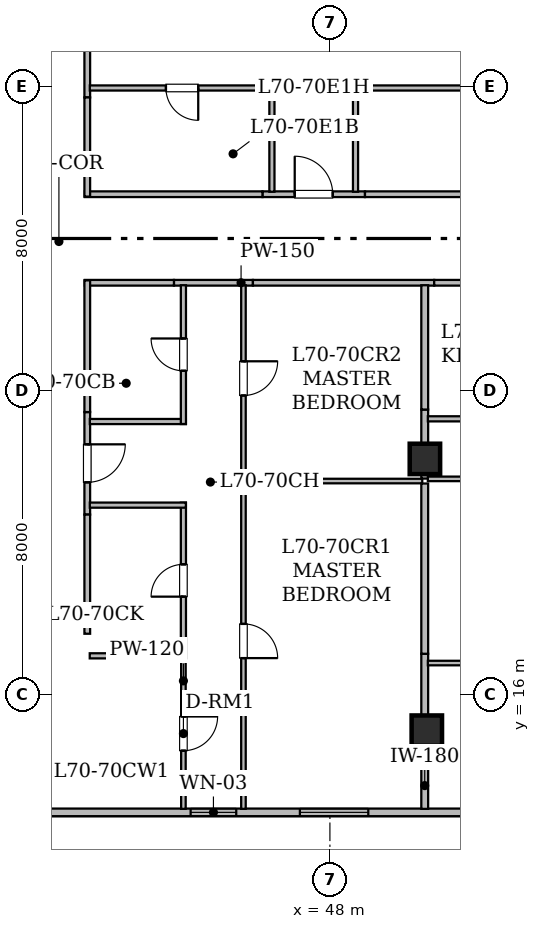
"""IFC4 building model, lengths in metres.
Left out: names, types, materials, properties, quantities, classifications, styles, units other than length and angle.
Written with IfcOpenShell. Run it as: python <this file> out.ifc"""

import sys

from ifc_helpers import new_model, si_unit, direction, frame, frame_2d, origin, origin_2d, place, context, subcontext, project, spatial, rectangle, hollow_rectangle, extrude, element, fill, save


model = new_model("IFC4")
c1 = context("Model", 3, precision=1e-05, world=origin(), true_north=direction((0.0, 1.0)))
c2 = subcontext(c1, "Body", "Model", "MODEL_VIEW")
j1 = project(units=[si_unit("LENGTHUNIT", "METRE"), si_unit("PLANEANGLEUNIT", "RADIAN")], contexts=[c1])
p1 = place(None, origin())
s1 = spatial("IfcSite", under=j1, at=p1, CompositionType="ELEMENT")
p2 = place(p1, origin())
s2 = spatial("IfcBuilding", under=s1, at=p2, CompositionType="ELEMENT")
p3 = place(p2, frame((0.0, 0.0, 273.65)))
s3 = spatial("IfcBuildingStorey", under=s2, at=p3, CompositionType="ELEMENT", Elevation=273.65)
p4 = place(p3, frame((50.55, 15.05, 0.0), z_axis=(0.0, 0.0, 1.0), x_axis=(1.0, 0.0, 0.0)))
e1 = element("IfcColumn", 1, at=p4, inside=s3, PredefinedType="COLUMN", context=c2, shape_type="SweptSolid", body=[
    extrude(hollow_rectangle(XDim=0.8, YDim=0.8, WallThickness=0.04, at=origin_2d()), origin(), (0.0, 0.0, 1.0), 4.175),
])
p5 = place(p3, frame((50.5, 22.2, 0.0), z_axis=(0.0, 0.0, 1.0), x_axis=(1.0, 0.0, 0.0)))
e2 = element("IfcColumn", 2, at=p5, inside=s3, PredefinedType="COLUMN", context=c2, shape_type="SweptSolid", body=[
    extrude(hollow_rectangle(XDim=0.8, YDim=0.8, WallThickness=0.04, at=origin_2d()), origin(), (0.0, 0.0, 1.0), 4.2),
])
p6 = place(p3, frame((64.296, 12.9, 0.0), z_axis=(0.0, 0.0, 1.0), x_axis=(-1.0, 0.0, 0.0)))
e3 = element("IfcWall", 3, at=p6, inside=s3, PredefinedType="STANDARD", context=c2, shape_type="SweptSolid", body=[
    extrude(rectangle(XDim=38.593, YDim=0.2, at=frame_2d((19.296, 0.0))), origin(), (0.0, 0.0, 1.0), 3.78),
])
p7 = place(p6, frame((29.086, 0.0, 0.85)))
e4 = element("IfcOpeningElement", 4, at=p7, cuts=e3, PredefinedType="OPENING", context=c2, shape_type="SweptSolid", body=[
    extrude(rectangle(XDim=1.8, YDim=0.92, at=frame_2d((0.9, 0.46))), frame((0.0, 0.11, 0.0), z_axis=(0.0, -1.0, 0.0), x_axis=(1.0, 0.0, 0.0)), (0.0, 0.0, 1.0), 0.22),
])
p8 = place(p6, frame((18.761, 0.0, 0.78)))
e5 = element("IfcOpeningElement", 5, at=p8, cuts=e3, PredefinedType="OPENING", context=c2, shape_type="SweptSolid", body=[
    extrude(rectangle(XDim=1.2, YDim=1.5, at=frame_2d((0.6, 0.75))), frame((0.0, 0.11, 0.0), z_axis=(0.0, -1.0, 0.0), x_axis=(1.0, 0.0, 0.0)), (0.0, 0.0, 1.0), 0.22),
])
p9 = place(p6, frame((15.286, 0.0, 0.85)))
e6 = element("IfcOpeningElement", 6, at=p9, cuts=e3, PredefinedType="OPENING", context=c2, shape_type="SweptSolid", body=[
    extrude(rectangle(XDim=1.8, YDim=0.92, at=frame_2d((0.9, 0.46))), frame((0.0, 0.11, 0.0), z_axis=(0.0, -1.0, 0.0), x_axis=(1.0, 0.0, 0.0)), (0.0, 0.0, 1.0), 0.22),
])
p10 = place(p6, frame((8.921, 0.0, 0.85)))
e7 = element("IfcOpeningElement", 7, at=p10, cuts=e3, PredefinedType="OPENING", context=c2, shape_type="SweptSolid", body=[
    extrude(rectangle(XDim=1.8, YDim=0.92, at=frame_2d((0.9, 0.46))), frame((0.0, 0.11, 0.0), z_axis=(0.0, -1.0, 0.0), x_axis=(1.0, 0.0, 0.0)), (0.0, 0.0, 1.0), 0.22),
])
p11 = place(p6, frame((1.633, 0.0, 0.85)))
e8 = element("IfcOpeningElement", 8, at=p11, cuts=e3, PredefinedType="OPENING", context=c2, shape_type="SweptSolid", body=[
    extrude(rectangle(XDim=1.8, YDim=0.92, at=frame_2d((0.9, 0.46))), frame((0.0, 0.11, 0.0), z_axis=(0.0, -1.0, 0.0), x_axis=(1.0, 0.0, 0.0)), (0.0, 0.0, 1.0), 0.22),
])
p12 = place(p3, frame((45.974, 26.835, 0.0), z_axis=(0.0, 0.0, 1.0), x_axis=(-1.0, 0.0, 0.0)))
e9 = element("IfcWall", 9, at=p12, inside=s3, PredefinedType="STANDARD", context=c2, shape_type="SweptSolid", body=[
    extrude(rectangle(XDim=2.078, YDim=0.15, at=frame_2d((1.039, 0.0))), origin(), (0.0, 0.0, 1.0), 3.78),
])
p13 = place(p3, frame((41.615, 23.433, 0.0), z_axis=(0.0, 0.0, 1.0), x_axis=(0.0, -1.0, 0.0)))
e10 = element("IfcWall", 10, at=p13, inside=s3, PredefinedType="STANDARD", context=c2, shape_type="SweptSolid", body=[
    extrude(rectangle(XDim=2.698, YDim=0.15, at=frame_2d((1.349, 0.0))), origin(), (0.0, 0.0, 1.0), 2.22),
])
p14 = place(p13, frame((0.849, 0.0, 0.0)))
e11 = element("IfcOpeningElement", 11, at=p14, cuts=e10, PredefinedType="OPENING", context=c2, shape_type="SweptSolid", body=[
    extrude(rectangle(XDim=1.0, YDim=2.15, at=frame_2d((0.5, 1.075))), frame((0.0, 0.085, 0.0), z_axis=(0.0, -1.0, 0.0), x_axis=(1.0, 0.0, 0.0)), (0.0, 0.0, 1.0), 0.17),
])
p15 = place(p3, frame((43.896, 26.835, 0.0), z_axis=(0.0, 0.0, 1.0), x_axis=(-1.0, 0.0, 0.0)))
e12 = element("IfcWall", 12, at=p15, inside=s3, PredefinedType="STANDARD", context=c2, shape_type="SweptSolid", body=[
    extrude(rectangle(XDim=2.346, YDim=0.15, at=frame_2d((1.173, 0.0))), origin(), (0.0, 0.0, 1.0), 3.78),
])
p16 = place(p3, frame((41.615, 26.898, 0.0), z_axis=(0.0, 0.0, 1.0), x_axis=(0.0, -1.0, 0.0)))
e13 = element("IfcWall", 13, at=p16, inside=s3, PredefinedType="STANDARD", context=c2, shape_type="SweptSolid", body=[
    extrude(rectangle(XDim=3.465, YDim=0.15, at=frame_2d((1.732, 0.0))), origin(), (0.0, 0.0, 1.0), 2.22),
])
p17 = place(p3, frame((41.615, 20.735, 0.0), z_axis=(0.0, 0.0, 1.0), x_axis=(0.0, -1.0, 0.0)))
e14 = element("IfcWall", 14, at=p17, inside=s3, PredefinedType="STANDARD", context=c2, shape_type="SweptSolid", body=[
    extrude(rectangle(XDim=3.135, YDim=0.15, at=frame_2d((1.567, 0.0))), origin(), (0.0, 0.0, 1.0), 2.22),
])
p18 = place(p3, frame((50.744, 26.835, 0.0), z_axis=(0.0, 0.0, 1.0), x_axis=(-1.0, 0.0, 0.0)))
e15 = element("IfcWall", 15, at=p18, inside=s3, PredefinedType="STANDARD", context=c2, shape_type="SweptSolid", body=[
    extrude(rectangle(XDim=4.77, YDim=0.15, at=frame_2d((2.385, 0.0))), origin(), (0.0, 0.0, 1.0), 2.22),
])
p19 = place(p3, frame((55.882, 26.835, 0.0), z_axis=(0.0, 0.0, 1.0), x_axis=(-1.0, 0.0, 0.0)))
e16 = element("IfcWall", 16, at=p19, inside=s3, PredefinedType="STANDARD", context=c2, shape_type="SweptSolid", body=[
    extrude(rectangle(XDim=5.138, YDim=0.15, at=frame_2d((2.569, 0.0))), origin(), (0.0, 0.0, 1.0), 2.22),
])
p20 = place(p3, frame((46.225, 29.165, 0.0), z_axis=(0.0, 0.0, 1.0), x_axis=(1.0, 0.0, 0.0)))
e17 = element("IfcWall", 17, at=p20, inside=s3, PredefinedType="STANDARD", context=c2, shape_type="SweptSolid", body=[
    extrude(rectangle(XDim=2.698, YDim=0.15, at=frame_2d((1.349, 0.0))), origin(), (0.0, 0.0, 1.0), 3.78),
])
p21 = place(p20, frame((0.849, 0.0, 0.0)))
e18 = element("IfcOpeningElement", 18, at=p21, cuts=e17, PredefinedType="OPENING", context=c2, shape_type="SweptSolid", body=[
    extrude(rectangle(XDim=1.0, YDim=2.15, at=frame_2d((0.5, 1.075))), frame((0.0, 0.085, 0.0), z_axis=(0.0, -1.0, 0.0), x_axis=(1.0, 0.0, 0.0)), (0.0, 0.0, 1.0), 0.17),
])
p22 = place(p3, frame((41.615, 33.789, 0.0), z_axis=(0.0, 0.0, 1.0), x_axis=(0.0, -1.0, 0.0)))
e19 = element("IfcWall", 19, at=p22, inside=s3, PredefinedType="STANDARD", context=c2, shape_type="SweptSolid", body=[
    extrude(rectangle(XDim=2.078, YDim=0.15, at=frame_2d((1.039, 0.0))), origin(), (0.0, 0.0, 1.0), 3.78),
])
p23 = place(p3, frame((41.55, 29.165, 0.0), z_axis=(0.0, 0.0, 1.0), x_axis=(1.0, 0.0, 0.0)))
e20 = element("IfcWall", 20, at=p23, inside=s3, PredefinedType="STANDARD", context=c2, shape_type="SweptSolid", body=[
    extrude(rectangle(XDim=4.675, YDim=0.15, at=frame_2d((2.337, 0.0))), origin(), (0.0, 0.0, 1.0), 3.78),
])
p24 = place(p3, frame((41.615, 31.711, 0.0), z_axis=(0.0, 0.0, 1.0), x_axis=(0.0, -1.0, 0.0)))
e21 = element("IfcWall", 21, at=p24, inside=s3, PredefinedType="STANDARD", context=c2, shape_type="SweptSolid", body=[
    extrude(rectangle(XDim=2.609, YDim=0.15, at=frame_2d((1.304, 0.0))), origin(), (0.0, 0.0, 1.0), 3.78),
])
p25 = place(p3, frame((48.923, 29.165, 0.0), z_axis=(0.0, 0.0, 1.0), x_axis=(1.0, 0.0, 0.0)))
e22 = element("IfcWall", 22, at=p25, inside=s3, PredefinedType="STANDARD", context=c2, shape_type="SweptSolid", body=[
    extrude(rectangle(XDim=7.16, YDim=0.15, at=frame_2d((3.58, 0.0))), origin(), (0.0, 0.0, 1.0), 2.22),
])
p26 = place(p3, frame((44.145, 16.954, 0.0), z_axis=(0.0, 0.0, 1.0), x_axis=(0.0, -1.0, 0.0)))
e23 = element("IfcWall", 23, at=p26, inside=s3, PredefinedType="PARTITIONING", context=c2, shape_type="SweptSolid", body=[
    extrude(rectangle(XDim=3.962, YDim=0.12, at=frame_2d((1.981, 0.0))), origin(), (0.0, 0.0, 1.0), 2.22),
])
p27 = place(p26, frame((1.531, 0.0, 0.0)))
e24 = element("IfcOpeningElement", 24, at=p27, cuts=e23, PredefinedType="OPENING", context=c2, shape_type="SweptSolid", body=[
    extrude(rectangle(XDim=0.9, YDim=2.1, at=frame_2d((0.45, 1.05))), frame((0.0, 0.07, 0.0), z_axis=(0.0, -1.0, 0.0), x_axis=(1.0, 0.0, 0.0)), (0.0, 0.0, 1.0), 0.14),
])
p28 = place(p3, frame((41.68, 17.019, 0.0), z_axis=(0.0, 0.0, 1.0), x_axis=(1.0, 0.0, 0.0)))
e25 = element("IfcWall", 25, at=p28, inside=s3, PredefinedType="PARTITIONING", context=c2, shape_type="SweptSolid", body=[
    extrude(rectangle(XDim=2.4, YDim=0.135, at=frame_2d((1.2, 0.0))), origin(), (0.0, 0.0, 1.0), 3.78),
])
p29 = place(p3, frame((41.682, 23.184, 0.0), z_axis=(0.0, 0.0, 1.0), x_axis=(1.0, 0.0, 0.0)))
e26 = element("IfcWall", 26, at=p29, inside=s3, PredefinedType="PARTITIONING", context=c2, shape_type="SweptSolid", body=[
    extrude(rectangle(XDim=2.528, YDim=0.135, at=frame_2d((1.264, 0.0))), origin(), (0.0, 0.0, 1.0), 2.22),
])
p30 = place(p3, frame((44.145, 23.119, 0.0), z_axis=(0.0, 0.0, 1.0), x_axis=(0.0, 1.0, 0.0)))
e27 = element("IfcWall", 27, at=p30, inside=s3, PredefinedType="PARTITIONING", context=c2, shape_type="SweptSolid", body=[
    extrude(rectangle(XDim=3.651, YDim=0.135, at=frame_2d((1.826, 0.0))), origin(), (0.0, 0.0, 1.0), 2.22),
])
p31 = place(p30, frame((1.4, 0.0, 0.0)))
e28 = element("IfcOpeningElement", 28, at=p31, cuts=e27, PredefinedType="OPENING", context=c2, shape_type="SweptSolid", body=[
    extrude(rectangle(XDim=0.85, YDim=2.1, at=frame_2d((0.425, 1.05))), frame((0.0, 0.077, 0.0), z_axis=(0.0, -1.0, 0.0), x_axis=(1.0, 0.0, 0.0)), (0.0, 0.0, 1.0), 0.155),
])
p32 = place(p3, frame((44.145, 16.954, 0.0), z_axis=(0.0, 0.0, 1.0), x_axis=(0.0, 1.0, 0.0)))
e29 = element("IfcWall", 29, at=p32, inside=s3, PredefinedType="PARTITIONING", context=c2, shape_type="SweptSolid", body=[
    extrude(rectangle(XDim=4.095, YDim=0.135, at=frame_2d((2.047, 0.0))), origin(), (0.0, 0.0, 1.0), 2.22),
])
p33 = place(p32, frame((1.622, 0.0, 0.0)))
e30 = element("IfcOpeningElement", 30, at=p33, cuts=e29, PredefinedType="OPENING", context=c2, shape_type="SweptSolid", body=[
    extrude(rectangle(XDim=0.85, YDim=2.1, at=frame_2d((0.425, 1.05))), frame((0.0, 0.077, 0.0), z_axis=(0.0, -1.0, 0.0), x_axis=(1.0, 0.0, 0.0)), (0.0, 0.0, 1.0), 0.155),
])
p34 = place(p3, frame((44.21, 20.984, 0.0), z_axis=(0.0, 0.0, 1.0), x_axis=(-1.0, 0.0, 0.0)))
e31 = element("IfcWall", 31, at=p34, inside=s3, PredefinedType="PARTITIONING", context=c2, shape_type="SweptSolid", body=[
    extrude(rectangle(XDim=2.528, YDim=0.135, at=frame_2d((1.264, 0.0))), origin(), (0.0, 0.0, 1.0), 3.78),
])
p35 = place(p3, frame((45.725, 21.867, 0.0), z_axis=(0.0, 0.0, 1.0), x_axis=(0.0, -1.0, 0.0)))
e32 = element("IfcWall", 32, at=p35, inside=s3, PredefinedType="PARTITIONING", context=c2, shape_type="SweptSolid", body=[
    extrude(rectangle(XDim=8.875, YDim=0.12, at=frame_2d((4.438, 0.0))), origin(), (0.0, 0.0, 1.0), 2.22),
])
p36 = place(p35, frame((4.008, 0.0, 0.0)))
e33 = element("IfcOpeningElement", 33, at=p36, cuts=e32, PredefinedType="OPENING", context=c2, shape_type="SweptSolid", body=[
    extrude(rectangle(XDim=0.9, YDim=2.1, at=frame_2d((0.45, 1.05))), frame((0.0, 0.07, 0.0), z_axis=(0.0, -1.0, 0.0), x_axis=(1.0, 0.0, 0.0)), (0.0, 0.0, 1.0), 0.14),
])
p37 = place(p3, frame((45.725, 26.77, 0.0), z_axis=(0.0, 0.0, 1.0), x_axis=(0.0, -1.0, 0.0)))
e34 = element("IfcWall", 34, at=p37, inside=s3, PredefinedType="PARTITIONING", context=c2, shape_type="SweptSolid", body=[
    extrude(rectangle(XDim=4.903, YDim=0.12, at=frame_2d((2.452, 0.0))), origin(), (0.0, 0.0, 1.0), 2.22),
])
p38 = place(p37, frame((2.001, 0.0, 0.0)))
e35 = element("IfcOpeningElement", 35, at=p38, cuts=e34, PredefinedType="OPENING", context=c2, shape_type="SweptSolid", body=[
    extrude(rectangle(XDim=0.9, YDim=2.1, at=frame_2d((0.45, 1.05))), frame((0.0, 0.07, 0.0), z_axis=(0.0, -1.0, 0.0), x_axis=(1.0, 0.0, 0.0)), (0.0, 0.0, 1.0), 0.14),
])
p39 = place(p3, frame((45.779, 21.618, 0.0), z_axis=(0.0, 0.0, 1.0), x_axis=(1.0, 0.0, 0.0)))
e36 = element("IfcWall", 36, at=p39, inside=s3, PredefinedType="PARTITIONING", context=c2, shape_type="SweptSolid", body=[
    extrude(rectangle(XDim=4.651, YDim=0.12, at=frame_2d((2.325, 0.0))), origin(), (0.0, 0.0, 1.0), 2.22),
])
p40 = place(p3, frame((50.495, 17.073, 0.0), z_axis=(0.0, 0.0, 1.0), x_axis=(0.0, -1.0, 0.0)))
e37 = element("IfcWall", 37, at=p40, inside=s3, PredefinedType="STANDARD", context=c2, shape_type="SweptSolid", body=[
    extrude(rectangle(XDim=4.081, YDim=0.18, at=frame_2d((2.041, 0.0))), origin(), (0.0, 0.0, 1.0), 2.22),
])
p41 = place(p3, frame((50.495, 21.553, 0.0), z_axis=(0.0, 0.0, 1.0), x_axis=(0.0, -1.0, 0.0)))
e38 = element("IfcWall", 38, at=p41, inside=s3, PredefinedType="STANDARD", context=c2, shape_type="SweptSolid", body=[
    extrude(rectangle(XDim=4.48, YDim=0.18, at=frame_2d((2.24, 0.0))), origin(), (0.0, 0.0, 1.0), 2.22),
])
p42 = place(p3, frame((50.495, 23.499, 0.0), z_axis=(0.0, 0.0, 1.0), x_axis=(0.0, -1.0, 0.0)))
e39 = element("IfcWall", 39, at=p42, inside=s3, PredefinedType="STANDARD", context=c2, shape_type="SweptSolid", body=[
    extrude(rectangle(XDim=1.816, YDim=0.18, at=frame_2d((0.908, 0.0))), origin(), (0.0, 0.0, 1.0), 2.22),
])
p43 = place(p3, frame((50.495, 26.77, 0.0), z_axis=(0.0, 0.0, 1.0), x_axis=(0.0, -1.0, 0.0)))
e40 = element("IfcWall", 40, at=p43, inside=s3, PredefinedType="STANDARD", context=c2, shape_type="SweptSolid", body=[
    extrude(rectangle(XDim=3.271, YDim=0.18, at=frame_2d((1.635, 0.0))), origin(), (0.0, 0.0, 1.0), 2.22),
])
p44 = place(p3, frame((50.577, 23.255, 0.0), z_axis=(0.0, 0.0, 1.0), x_axis=(1.0, 0.0, 0.0)))
e41 = element("IfcWall", 41, at=p44, inside=s3, PredefinedType="PARTITIONING", context=c2, shape_type="SweptSolid", body=[
    extrude(rectangle(XDim=5.619, YDim=0.135, at=frame_2d((2.81, 0.0))), origin(), (0.0, 0.0, 1.0), 2.22),
])
p45 = place(p44, frame((2.385, 0.0, 0.0)))
e42 = element("IfcOpeningElement", 42, at=p45, cuts=e41, PredefinedType="OPENING", context=c2, shape_type="SweptSolid", body=[
    extrude(rectangle(XDim=0.85, YDim=2.1, at=frame_2d((0.425, 1.05))), frame((0.0, 0.077, 0.0), z_axis=(0.0, -1.0, 0.0), x_axis=(1.0, 0.0, 0.0)), (0.0, 0.0, 1.0), 0.155),
])
p46 = place(p3, frame((58.51, 21.675, 0.0), z_axis=(0.0, 0.0, 1.0), x_axis=(-1.0, 0.0, 0.0)))
e43 = element("IfcWall", 43, at=p46, inside=s3, PredefinedType="PARTITIONING", context=c2, shape_type="SweptSolid", body=[
    extrude(rectangle(XDim=7.933, YDim=0.12, at=frame_2d((3.967, 0.0))), origin(), (0.0, 0.0, 1.0), 2.22),
])
p47 = place(p46, frame((3.516, 0.0, 0.0)))
e44 = element("IfcOpeningElement", 44, at=p47, cuts=e43, PredefinedType="OPENING", context=c2, shape_type="SweptSolid", body=[
    extrude(rectangle(XDim=0.9, YDim=2.1, at=frame_2d((0.45, 1.05))), frame((0.0, 0.07, 0.0), z_axis=(0.0, -1.0, 0.0), x_axis=(1.0, 0.0, 0.0)), (0.0, 0.0, 1.0), 0.14),
])
p48 = place(p3, frame((50.577, 16.829, 0.0), z_axis=(0.0, 0.0, 1.0), x_axis=(1.0, 0.0, 0.0)))
e45 = element("IfcWall", 45, at=p48, inside=s3, PredefinedType="PARTITIONING", context=c2, shape_type="SweptSolid", body=[
    extrude(rectangle(XDim=7.814, YDim=0.12, at=frame_2d((3.907, 0.0))), origin(), (0.0, 0.0, 1.0), 2.22),
])
p49 = place(p3, frame((46.474, 29.23, 0.0), z_axis=(0.0, 0.0, 1.0), x_axis=(0.0, 1.0, 0.0)))
e46 = element("IfcWall", 46, at=p49, inside=s3, PredefinedType="PARTITIONING", context=c2, shape_type="SweptSolid", body=[
    extrude(rectangle(XDim=2.795, YDim=0.135, at=frame_2d((1.397, 0.0))), origin(), (0.0, 0.0, 1.0), 3.78),
])
p50 = place(p3, frame((46.539, 31.96, 0.0), z_axis=(0.0, 0.0, 1.0), x_axis=(-1.0, 0.0, 0.0)))
e47 = element("IfcWall", 47, at=p50, inside=s3, PredefinedType="PARTITIONING", context=c2, shape_type="SweptSolid", body=[
    extrude(rectangle(XDim=4.857, YDim=0.135, at=frame_2d((2.429, 0.0))), origin(), (0.0, 0.0, 1.0), 3.78),
])
p51 = place(p50, frame((2.004, 0.0, 0.0)))
e48 = element("IfcOpeningElement", 48, at=p51, cuts=e47, PredefinedType="OPENING", context=c2, shape_type="SweptSolid", body=[
    extrude(rectangle(XDim=0.85, YDim=2.1, at=frame_2d((0.425, 1.05))), frame((0.0, 0.077, 0.0), z_axis=(0.0, -1.0, 0.0), x_axis=(1.0, 0.0, 0.0)), (0.0, 0.0, 1.0), 0.155),
])
p52 = place(p3, frame((55.768, 31.96, 0.0), z_axis=(0.0, 0.0, 1.0), x_axis=(-1.0, 0.0, 0.0)))
e49 = element("IfcWall", 49, at=p52, inside=s3, PredefinedType="PARTITIONING", context=c2, shape_type="SweptSolid", body=[
    extrude(rectangle(XDim=7.159, YDim=0.135, at=frame_2d((3.58, 0.0))), origin(), (0.0, 0.0, 1.0), 2.22),
])
p53 = place(p52, frame((3.155, 0.0, 0.0)))
e50 = element("IfcOpeningElement", 50, at=p53, cuts=e49, PredefinedType="OPENING", context=c2, shape_type="SweptSolid", body=[
    extrude(rectangle(XDim=0.85, YDim=2.1, at=frame_2d((0.425, 1.05))), frame((0.0, 0.077, 0.0), z_axis=(0.0, -1.0, 0.0), x_axis=(1.0, 0.0, 0.0)), (0.0, 0.0, 1.0), 0.155),
])
p54 = place(p3, frame((48.674, 32.025, 0.0), z_axis=(0.0, 0.0, 1.0), x_axis=(0.0, -1.0, 0.0)))
e51 = element("IfcWall", 51, at=p54, inside=s3, PredefinedType="PARTITIONING", context=c2, shape_type="SweptSolid", body=[
    extrude(rectangle(XDim=2.795, YDim=0.135, at=frame_2d((1.397, 0.0))), origin(), (0.0, 0.0, 1.0), 3.78),
])
p55 = place(p8, origin())
e52 = element("IfcWindow", 52, at=p55, inside=s3, PartitioningType="SINGLE_PANEL", PredefinedType="WINDOW", context=c2, shape_type="SweptSolid", body=[
    extrude(rectangle(XDim=1.2, YDim=1.5, at=frame_2d((0.6, 0.75))), frame((0.0, 0.03, 0.0), z_axis=(0.0, -1.0, 0.0), x_axis=(1.0, 0.0, 0.0)), (0.0, 0.0, 1.0), 0.06),
])
fill(e5, e52)
p56 = place(p9, origin())
e53 = element("IfcWindow", 53, at=p56, inside=s3, PartitioningType="SINGLE_PANEL", PredefinedType="WINDOW", context=c2, shape_type="SweptSolid", body=[
    extrude(rectangle(XDim=1.8, YDim=0.92, at=frame_2d((0.9, 0.46))), frame((0.0, 0.03, 0.0), z_axis=(0.0, -1.0, 0.0), x_axis=(1.0, 0.0, 0.0)), (0.0, 0.0, 1.0), 0.06),
])
fill(e6, e53)
p57 = place(p14, origin())
e54 = element("IfcDoor", 54, at=p57, inside=s3, OperationType="SINGLE_SWING_LEFT", PredefinedType="DOOR", context=c2, shape_type="SweptSolid", body=[
    extrude(rectangle(XDim=1.0, YDim=2.15, at=frame_2d((0.5, 1.075))), frame((0.0, 0.025, 0.0), z_axis=(0.0, -1.0, 0.0), x_axis=(1.0, 0.0, 0.0)), (0.0, 0.0, 1.0), 0.05),
])
fill(e11, e54)
p58 = place(p21, origin())
e55 = element("IfcDoor", 55, at=p58, inside=s3, OperationType="SINGLE_SWING_LEFT", PredefinedType="DOOR", context=c2, shape_type="SweptSolid", body=[
    extrude(rectangle(XDim=1.0, YDim=2.15, at=frame_2d((0.5, 1.075))), frame((0.0, 0.025, 0.0), z_axis=(0.0, -1.0, 0.0), x_axis=(1.0, 0.0, 0.0)), (0.0, 0.0, 1.0), 0.05),
])
fill(e18, e55)
p59 = place(p27, origin())
e56 = element("IfcDoor", 56, at=p59, inside=s3, OperationType="SINGLE_SWING_LEFT", PredefinedType="DOOR", context=c2, shape_type="SweptSolid", body=[
    extrude(rectangle(XDim=0.9, YDim=2.1, at=frame_2d((0.45, 1.05))), frame((0.0, 0.025, 0.0), z_axis=(0.0, -1.0, 0.0), x_axis=(1.0, 0.0, 0.0)), (0.0, 0.0, 1.0), 0.05),
])
fill(e24, e56)
p60 = place(p31, origin())
e57 = element("IfcDoor", 57, at=p60, inside=s3, OperationType="SINGLE_SWING_RIGHT", PredefinedType="DOOR", context=c2, shape_type="SweptSolid", body=[
    extrude(rectangle(XDim=0.85, YDim=2.1, at=frame_2d((0.425, 1.05))), frame((0.0, 0.025, 0.0), z_axis=(0.0, -1.0, 0.0), x_axis=(1.0, 0.0, 0.0)), (0.0, 0.0, 1.0), 0.05),
])
fill(e28, e57)
p61 = place(p33, origin())
e58 = element("IfcDoor", 58, at=p61, inside=s3, OperationType="SINGLE_SWING_LEFT", PredefinedType="DOOR", context=c2, shape_type="SweptSolid", body=[
    extrude(rectangle(XDim=0.85, YDim=2.1, at=frame_2d((0.425, 1.05))), frame((0.0, 0.025, 0.0), z_axis=(0.0, -1.0, 0.0), x_axis=(1.0, 0.0, 0.0)), (0.0, 0.0, 1.0), 0.05),
])
fill(e30, e58)
p62 = place(p36, origin())
e59 = element("IfcDoor", 59, at=p62, inside=s3, OperationType="SINGLE_SWING_RIGHT", PredefinedType="DOOR", context=c2, shape_type="SweptSolid", body=[
    extrude(rectangle(XDim=0.9, YDim=2.1, at=frame_2d((0.45, 1.05))), frame((0.0, 0.025, 0.0), z_axis=(0.0, -1.0, 0.0), x_axis=(1.0, 0.0, 0.0)), (0.0, 0.0, 1.0), 0.05),
])
fill(e33, e59)
p63 = place(p38, origin())
e60 = element("IfcDoor", 60, at=p63, inside=s3, OperationType="SINGLE_SWING_LEFT", PredefinedType="DOOR", context=c2, shape_type="SweptSolid", body=[
    extrude(rectangle(XDim=0.9, YDim=2.1, at=frame_2d((0.45, 1.05))), frame((0.0, 0.025, 0.0), z_axis=(0.0, -1.0, 0.0), x_axis=(1.0, 0.0, 0.0)), (0.0, 0.0, 1.0), 0.05),
])
fill(e35, e60)
p64 = place(p51, origin())
e61 = element("IfcDoor", 61, at=p64, inside=s3, OperationType="SINGLE_SWING_LEFT", PredefinedType="DOOR", context=c2, shape_type="SweptSolid", body=[
    extrude(rectangle(XDim=0.85, YDim=2.1, at=frame_2d((0.425, 1.05))), frame((0.0, 0.025, 0.0), z_axis=(0.0, -1.0, 0.0), x_axis=(1.0, 0.0, 0.0)), (0.0, 0.0, 1.0), 0.05),
])
fill(e48, e61)
save(model, sys.argv[1])
